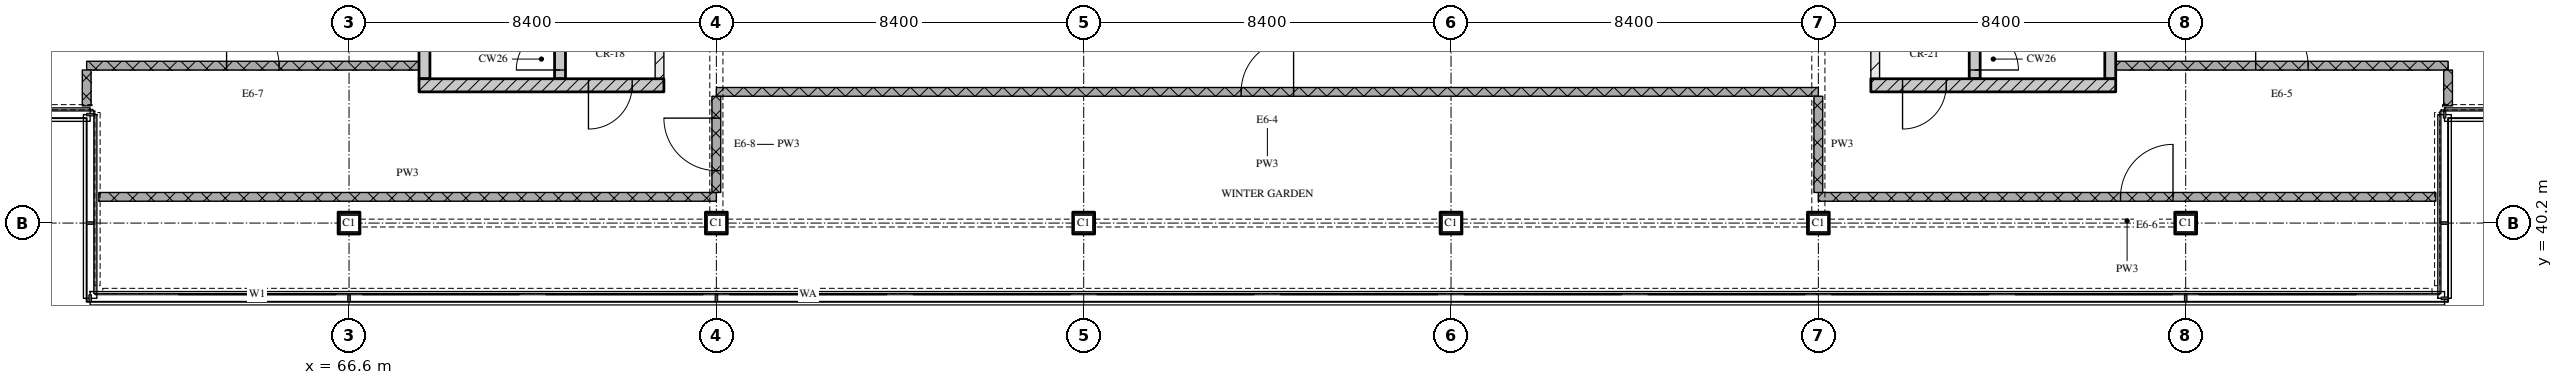
"""IFC4 building model, lengths in metres.
Left out: names, types, materials, properties, quantities, classifications, styles, units other than length and angle.
Written with IfcOpenShell. Run it as: python <this file> out.ifc"""

import sys

from ifc_helpers import new_model, si_unit, direction, frame, frame_2d, origin, origin_2d, place, context, subcontext, project, spatial, rectangle, extrude, element, fill, save


model = new_model("IFC4")
c1 = context("Model", 3, precision=1e-05, world=origin(), true_north=direction((0.0, 1.0)))
c2 = subcontext(c1, "Body", "Model", "MODEL_VIEW")
j1 = project(units=[si_unit("LENGTHUNIT", "METRE"), si_unit("PLANEANGLEUNIT", "RADIAN")], contexts=[c1])
p1 = place(None, origin())
s1 = spatial("IfcSite", under=j1, at=p1, CompositionType="ELEMENT")
p2 = place(p1, origin())
s2 = spatial("IfcBuilding", under=s1, at=p2, CompositionType="ELEMENT")
p3 = place(p2, frame((0.0, 0.0, 303.15)))
s3 = spatial("IfcBuildingStorey", under=s2, at=p3, CompositionType="ELEMENT", Elevation=303.15)
for number, where, z_axis, x_axis in (
    (1, (66.6, 40.2, 0.0), (0.0, 0.0, 1.0), (1.0, 0.0, 0.0)),
    (2, (75.0, 40.2, 0.0), (0.0, 0.0, 1.0), (1.0, 0.0, 0.0)),
    (3, (83.4, 40.2, 0.0), (0.0, 0.0, 1.0), (1.0, 0.0, 0.0)),
    (4, (91.8, 40.2, 0.0), (0.0, 0.0, 1.0), (1.0, 0.0, 0.0)),
    (5, (100.2, 40.2, 0.0), (0.0, 0.0, 1.0), (1.0, 0.0, 0.0)),
    (6, (108.6, 40.2, 0.0), (0.0, 0.0, 1.0), (1.0, 0.0, 0.0)),
):
    element("IfcColumn", number, at=place(p3, frame(where, z_axis=z_axis, x_axis=x_axis)), inside=s3, PredefinedType="COLUMN", context=c2, shape_type="SweptSolid", body=[
        extrude(rectangle(XDim=0.5, YDim=0.5, at=origin_2d()), origin(), (0.0, 0.0, 1.0), 3.6),
    ])
p4 = place(p3, frame((68.2, 43.35, 0.0), z_axis=(0.0, 0.0, 1.0), x_axis=(1.0, 0.0, 0.0)))
e7 = element("IfcWall", 7, at=p4, inside=s3, PredefinedType="SOLIDWALL", context=c2, shape_type="SweptSolid", body=[
    extrude(rectangle(XDim=5.6, YDim=0.3, at=frame_2d((2.8, 0.0))), origin(), (0.0, 0.0, 1.0), 3.32),
])
p5 = place(p4, frame((3.875, 0.0, 0.0)))
e8 = element("IfcOpeningElement", 8, at=p5, cuts=e7, PredefinedType="OPENING", context=c2, shape_type="SweptSolid", body=[
    extrude(rectangle(XDim=1.0, YDim=2.1, at=frame_2d((0.5, 1.05))), frame((0.0, 0.16, 0.0), z_axis=(0.0, -1.0, 0.0), x_axis=(1.0, 0.0, 0.0)), (0.0, 0.0, 1.0), 0.32),
])
p6 = place(p3, frame((68.325, 43.5, 0.0), z_axis=(0.0, 0.0, 1.0), x_axis=(0.0, 1.0, 0.0)))
e9 = element("IfcWall", 9, at=p6, inside=s3, PredefinedType="SOLIDWALL", context=c2, shape_type="SweptSolid", body=[
    extrude(rectangle(XDim=6.9, YDim=0.25, at=frame_2d((3.45, 0.0))), origin(), (0.0, 0.0, 1.0), 3.32),
])
p7 = place(p3, frame((71.425, 43.5, 0.0), z_axis=(0.0, 0.0, 1.0), x_axis=(0.0, 1.0, 0.0)))
e10 = element("IfcWall", 10, at=p7, inside=s3, PredefinedType="SOLIDWALL", context=c2, shape_type="SweptSolid", body=[
    extrude(rectangle(XDim=6.9, YDim=0.25, at=frame_2d((3.45, 0.0))), origin(), (0.0, 0.0, 1.0), 3.32),
])
p8 = place(p7, frame((0.2, 0.0, 0.0)))
e11 = element("IfcOpeningElement", 11, at=p8, cuts=e10, PredefinedType="OPENING", context=c2, shape_type="SweptSolid", body=[
    extrude(rectangle(XDim=1.0, YDim=2.1, at=frame_2d((0.5, 1.05))), frame((0.0, 0.135, 0.0), z_axis=(0.0, -1.0, 0.0), x_axis=(1.0, 0.0, 0.0)), (0.0, 0.0, 1.0), 0.27),
])
p9 = place(p3, frame((73.7, 43.5, 0.0), z_axis=(0.0, 0.0, 1.0), x_axis=(0.0, 1.0, 0.0)))
e12 = element("IfcWall", 12, at=p9, inside=s3, PredefinedType="PARTITIONING", context=c2, shape_type="SweptSolid", body=[
    extrude(rectangle(XDim=6.9, YDim=0.2, at=frame_2d((3.45, 0.0))), origin(), (0.0, 0.0, 1.0), 3.32),
])
p10 = place(p9, frame((1.0, 0.0, 0.0)))
e13 = element("IfcOpeningElement", 13, at=p10, cuts=e12, PredefinedType="OPENING", context=c2, shape_type="SweptSolid", body=[
    extrude(rectangle(XDim=1.0, YDim=2.1, at=frame_2d((0.5, 1.05))), frame((0.0, 0.11, 0.0), z_axis=(0.0, -1.0, 0.0), x_axis=(1.0, 0.0, 0.0)), (0.0, 0.0, 1.0), 0.22),
])
p11 = place(p3, frame((101.4, 43.35, 0.0), z_axis=(0.0, 0.0, 1.0), x_axis=(1.0, 0.0, 0.0)))
e14 = element("IfcWall", 14, at=p11, inside=s3, PredefinedType="SOLIDWALL", context=c2, shape_type="SweptSolid", body=[
    extrude(rectangle(XDim=5.6, YDim=0.3, at=frame_2d((2.8, 0.0))), origin(), (0.0, 0.0, 1.0), 3.32),
])
p12 = place(p11, frame((0.725, 0.0, 0.0)))
e15 = element("IfcOpeningElement", 15, at=p12, cuts=e14, PredefinedType="OPENING", context=c2, shape_type="SweptSolid", body=[
    extrude(rectangle(XDim=1.0, YDim=2.1, at=frame_2d((0.5, 1.05))), frame((0.0, 0.16, 0.0), z_axis=(0.0, -1.0, 0.0), x_axis=(1.0, 0.0, 0.0)), (0.0, 0.0, 1.0), 0.32),
])
p13 = place(p3, frame((101.5, 43.5, 0.0), z_axis=(0.0, 0.0, 1.0), x_axis=(0.0, 1.0, 0.0)))
e16 = element("IfcWall", 16, at=p13, inside=s3, PredefinedType="PARTITIONING", context=c2, shape_type="SweptSolid", body=[
    extrude(rectangle(XDim=6.9, YDim=0.2, at=frame_2d((3.45, 0.0))), origin(), (0.0, 0.0, 1.0), 3.32),
])
p14 = place(p13, frame((1.0, 0.0, 0.0)))
e17 = element("IfcOpeningElement", 17, at=p14, cuts=e16, PredefinedType="OPENING", context=c2, shape_type="SweptSolid", body=[
    extrude(rectangle(XDim=1.0, YDim=2.1, at=frame_2d((0.5, 1.05))), frame((0.0, 0.11, 0.0), z_axis=(0.0, -1.0, 0.0), x_axis=(1.0, 0.0, 0.0)), (0.0, 0.0, 1.0), 0.22),
])
p15 = place(p3, frame((103.775, 43.5, 0.0), z_axis=(0.0, 0.0, 1.0), x_axis=(0.0, 1.0, 0.0)))
e18 = element("IfcWall", 18, at=p15, inside=s3, PredefinedType="SOLIDWALL", context=c2, shape_type="SweptSolid", body=[
    extrude(rectangle(XDim=6.9, YDim=0.25, at=frame_2d((3.45, 0.0))), origin(), (0.0, 0.0, 1.0), 3.32),
])
p16 = place(p15, frame((0.2, 0.0, 0.0)))
e19 = element("IfcOpeningElement", 19, at=p16, cuts=e18, PredefinedType="OPENING", context=c2, shape_type="SweptSolid", body=[
    extrude(rectangle(XDim=1.0, YDim=2.1, at=frame_2d((0.5, 1.05))), frame((0.0, 0.135, 0.0), z_axis=(0.0, -1.0, 0.0), x_axis=(1.0, 0.0, 0.0)), (0.0, 0.0, 1.0), 0.27),
])
p17 = place(p3, frame((106.875, 43.5, 0.0), z_axis=(0.0, 0.0, 1.0), x_axis=(0.0, 1.0, 0.0)))
e20 = element("IfcWall", 20, at=p17, inside=s3, PredefinedType="SOLIDWALL", context=c2, shape_type="SweptSolid", body=[
    extrude(rectangle(XDim=6.9, YDim=0.25, at=frame_2d((3.45, 0.0))), origin(), (0.0, 0.0, 1.0), 3.32),
])
p18 = place(p3, frame((60.88, 40.8, 0.0), z_axis=(0.0, 0.0, 1.0), x_axis=(1.0, 0.0, 0.0)))
e21 = element("IfcWall", 21, at=p18, inside=s3, PredefinedType="PARTITIONING", context=c2, shape_type="SweptSolid", body=[
    extrude(rectangle(XDim=14.12, YDim=0.2, at=frame_2d((7.06, 0.0))), origin(), (0.0, 0.0, 1.0), 3.32),
])
p19 = place(p3, frame((114.32, 40.8, 0.0), z_axis=(0.0, 0.0, 1.0), x_axis=(-1.0, 0.0, 0.0)))
e22 = element("IfcWall", 22, at=p19, inside=s3, PredefinedType="PARTITIONING", context=c2, shape_type="SweptSolid", body=[
    extrude(rectangle(XDim=14.12, YDim=0.2, at=frame_2d((7.06, 0.0))), origin(), (0.0, 0.0, 1.0), 3.32),
])
p20 = place(p19, frame((6.01, 0.0, 0.0)))
e23 = element("IfcOpeningElement", 23, at=p20, cuts=e22, PredefinedType="OPENING", context=c2, shape_type="SweptSolid", body=[
    extrude(rectangle(XDim=1.2, YDim=2.1, at=frame_2d((0.6, 1.05))), frame((0.0, 0.11, 0.0), z_axis=(0.0, -1.0, 0.0), x_axis=(1.0, 0.0, 0.0)), (0.0, 0.0, 1.0), 0.22),
])
p21 = place(p3, frame((100.2, 43.2, 0.0), z_axis=(0.0, 0.0, 1.0), x_axis=(-1.0, 0.0, 0.0)))
e24 = element("IfcWall", 24, at=p21, inside=s3, PredefinedType="PARTITIONING", context=c2, shape_type="SweptSolid", body=[
    extrude(rectangle(XDim=25.2, YDim=0.2, at=frame_2d((12.6, 0.0))), origin(), (0.0, 0.0, 1.0), 3.32),
])
p22 = place(p21, frame((12.0, 0.0, 0.0)))
e25 = element("IfcOpeningElement", 25, at=p22, cuts=e24, PredefinedType="OPENING", context=c2, shape_type="SweptSolid", body=[
    extrude(rectangle(XDim=1.2, YDim=2.1, at=frame_2d((0.6, 1.05))), frame((0.0, 0.11, 0.0), z_axis=(0.0, -1.0, 0.0), x_axis=(1.0, 0.0, 0.0)), (0.0, 0.0, 1.0), 0.22),
])
p23 = place(p3, frame((60.6, 43.8, 0.0), z_axis=(0.0, 0.0, 1.0), x_axis=(1.0, 0.0, 0.0)))
e26 = element("IfcWall", 26, at=p23, inside=s3, PredefinedType="PARTITIONING", context=c2, shape_type="SweptSolid", body=[
    extrude(rectangle(XDim=7.6, YDim=0.2, at=frame_2d((3.8, 0.0))), origin(), (0.0, 0.0, 1.0), 3.32),
])
p24 = place(p23, frame((3.2, 0.0, 0.0)))
e27 = element("IfcOpeningElement", 27, at=p24, cuts=e26, PredefinedType="OPENING", context=c2, shape_type="SweptSolid", body=[
    extrude(rectangle(XDim=1.2, YDim=2.1, at=frame_2d((0.6, 1.05))), frame((0.0, 0.11, 0.0), z_axis=(0.0, -1.0, 0.0), x_axis=(1.0, 0.0, 0.0)), (0.0, 0.0, 1.0), 0.22),
])
p25 = place(p3, frame((107.0, 43.8, 0.0), z_axis=(0.0, 0.0, 1.0), x_axis=(1.0, 0.0, 0.0)))
e28 = element("IfcWall", 28, at=p25, inside=s3, PredefinedType="PARTITIONING", context=c2, shape_type="SweptSolid", body=[
    extrude(rectangle(XDim=7.6, YDim=0.2, at=frame_2d((3.8, 0.0))), origin(), (0.0, 0.0, 1.0), 3.32),
])
p26 = place(p25, frame((3.2, 0.0, 0.0)))
e29 = element("IfcOpeningElement", 29, at=p26, cuts=e28, PredefinedType="OPENING", context=c2, shape_type="SweptSolid", body=[
    extrude(rectangle(XDim=1.2, YDim=2.1, at=frame_2d((0.6, 1.05))), frame((0.0, 0.11, 0.0), z_axis=(0.0, -1.0, 0.0), x_axis=(1.0, 0.0, 0.0)), (0.0, 0.0, 1.0), 0.22),
])
p27 = place(p3, frame((60.6, 43.7, 0.0), z_axis=(0.0, 0.0, 1.0), x_axis=(0.0, -1.0, 0.0)))
e30 = element("IfcWall", 30, at=p27, inside=s3, PredefinedType="PARTITIONING", context=c2, shape_type="SweptSolid", body=[
    extrude(rectangle(XDim=0.82, YDim=0.2, at=frame_2d((0.41, 0.0))), origin(), (0.0, 0.0, 1.0), 3.32),
])
p28 = place(p3, frame((75.0, 43.1, 0.0), z_axis=(0.0, 0.0, 1.0), x_axis=(0.0, -1.0, 0.0)))
e31 = element("IfcWall", 31, at=p28, inside=s3, PredefinedType="PARTITIONING", context=c2, shape_type="SweptSolid", body=[
    extrude(rectangle(XDim=2.2, YDim=0.2, at=frame_2d((1.1, 0.0))), origin(), (0.0, 0.0, 1.0), 2.53),
])
p29 = place(p28, frame((0.5, 0.0, 0.0)))
e32 = element("IfcOpeningElement", 32, at=p29, cuts=e31, PredefinedType="OPENING", context=c2, shape_type="SweptSolid", body=[
    extrude(rectangle(XDim=1.2, YDim=2.1, at=frame_2d((0.6, 1.05))), frame((0.0, 0.11, 0.0), z_axis=(0.0, -1.0, 0.0), x_axis=(1.0, 0.0, 0.0)), (0.0, 0.0, 1.0), 0.22),
])
p30 = place(p3, frame((100.2, 43.1, 0.0), z_axis=(0.0, 0.0, 1.0), x_axis=(0.0, -1.0, 0.0)))
e33 = element("IfcWall", 33, at=p30, inside=s3, PredefinedType="PARTITIONING", context=c2, shape_type="SweptSolid", body=[
    extrude(rectangle(XDim=2.2, YDim=0.2, at=frame_2d((1.1, 0.0))), origin(), (0.0, 0.0, 1.0), 2.53),
])
p31 = place(p3, frame((114.6, 43.7, 0.0), z_axis=(0.0, 0.0, 1.0), x_axis=(0.0, -1.0, 0.0)))
e34 = element("IfcWall", 34, at=p31, inside=s3, PredefinedType="PARTITIONING", context=c2, shape_type="SweptSolid", body=[
    extrude(rectangle(XDim=0.82, YDim=0.2, at=frame_2d((0.41, 0.0))), origin(), (0.0, 0.0, 1.0), 3.32),
])
p32 = place(p5, origin())
e35 = element("IfcDoor", 35, at=p32, inside=s3, OperationType="SINGLE_SWING_RIGHT", PredefinedType="DOOR", context=c2, shape_type="SweptSolid", body=[
    extrude(rectangle(XDim=1.0, YDim=2.1, at=frame_2d((0.5, 1.05))), frame((0.0, 0.025, 0.0), z_axis=(0.0, -1.0, 0.0), x_axis=(1.0, 0.0, 0.0)), (0.0, 0.0, 1.0), 0.05),
])
fill(e8, e35)
p33 = place(p8, origin())
e36 = element("IfcDoor", 36, at=p33, inside=s3, OperationType="SINGLE_SWING_LEFT", PredefinedType="DOOR", context=c2, shape_type="SweptSolid", body=[
    extrude(rectangle(XDim=1.0, YDim=2.1, at=frame_2d((0.5, 1.05))), frame((0.0, 0.025, 0.0), z_axis=(0.0, -1.0, 0.0), x_axis=(1.0, 0.0, 0.0)), (0.0, 0.0, 1.0), 0.05),
])
fill(e11, e36)
p34 = place(p12, origin())
e37 = element("IfcDoor", 37, at=p34, inside=s3, OperationType="SINGLE_SWING_RIGHT", PredefinedType="DOOR", context=c2, shape_type="SweptSolid", body=[
    extrude(rectangle(XDim=1.0, YDim=2.1, at=frame_2d((0.5, 1.05))), frame((0.0, 0.025, 0.0), z_axis=(0.0, -1.0, 0.0), x_axis=(1.0, 0.0, 0.0)), (0.0, 0.0, 1.0), 0.05),
])
fill(e15, e37)
p35 = place(p16, origin())
e38 = element("IfcDoor", 38, at=p35, inside=s3, OperationType="SINGLE_SWING_RIGHT", PredefinedType="DOOR", context=c2, shape_type="SweptSolid", body=[
    extrude(rectangle(XDim=1.0, YDim=2.1, at=frame_2d((0.5, 1.05))), frame((0.0, 0.025, 0.0), z_axis=(0.0, -1.0, 0.0), x_axis=(1.0, 0.0, 0.0)), (0.0, 0.0, 1.0), 0.05),
])
fill(e19, e38)
p36 = place(p20, origin())
e39 = element("IfcDoor", 39, at=p36, inside=s3, OperationType="SINGLE_SWING_RIGHT", PredefinedType="DOOR", context=c2, shape_type="SweptSolid", body=[
    extrude(rectangle(XDim=1.2, YDim=2.1, at=frame_2d((0.6, 1.05))), frame((0.0, 0.025, 0.0), z_axis=(0.0, -1.0, 0.0), x_axis=(1.0, 0.0, 0.0)), (0.0, 0.0, 1.0), 0.05),
])
fill(e23, e39)
p37 = place(p22, origin())
e40 = element("IfcDoor", 40, at=p37, inside=s3, OperationType="SINGLE_SWING_RIGHT", PredefinedType="DOOR", context=c2, shape_type="SweptSolid", body=[
    extrude(rectangle(XDim=1.2, YDim=2.1, at=frame_2d((0.6, 1.05))), frame((0.0, 0.025, 0.0), z_axis=(0.0, -1.0, 0.0), x_axis=(1.0, 0.0, 0.0)), (0.0, 0.0, 1.0), 0.05),
])
fill(e25, e40)
p38 = place(p24, origin())
e41 = element("IfcDoor", 41, at=p38, inside=s3, OperationType="SINGLE_SWING_LEFT", PredefinedType="DOOR", context=c2, shape_type="SweptSolid", body=[
    extrude(rectangle(XDim=1.2, YDim=2.1, at=frame_2d((0.6, 1.05))), frame((0.0, 0.025, 0.0), z_axis=(0.0, -1.0, 0.0), x_axis=(1.0, 0.0, 0.0)), (0.0, 0.0, 1.0), 0.05),
])
fill(e27, e41)
p39 = place(p26, origin())
e42 = element("IfcDoor", 42, at=p39, inside=s3, OperationType="SINGLE_SWING_LEFT", PredefinedType="DOOR", context=c2, shape_type="SweptSolid", body=[
    extrude(rectangle(XDim=1.2, YDim=2.1, at=frame_2d((0.6, 1.05))), frame((0.0, 0.025, 0.0), z_axis=(0.0, -1.0, 0.0), x_axis=(1.0, 0.0, 0.0)), (0.0, 0.0, 1.0), 0.05),
])
fill(e29, e42)
p40 = place(p29, origin())
e43 = element("IfcDoor", 43, at=p40, inside=s3, OperationType="SINGLE_SWING_RIGHT", PredefinedType="DOOR", context=c2, shape_type="SweptSolid", body=[
    extrude(rectangle(XDim=1.2, YDim=2.1, at=frame_2d((0.6, 1.05))), frame((0.0, 0.025, 0.0), z_axis=(0.0, -1.0, 0.0), x_axis=(1.0, 0.0, 0.0)), (0.0, 0.0, 1.0), 0.05),
])
fill(e32, e43)
save(model, sys.argv[1])
